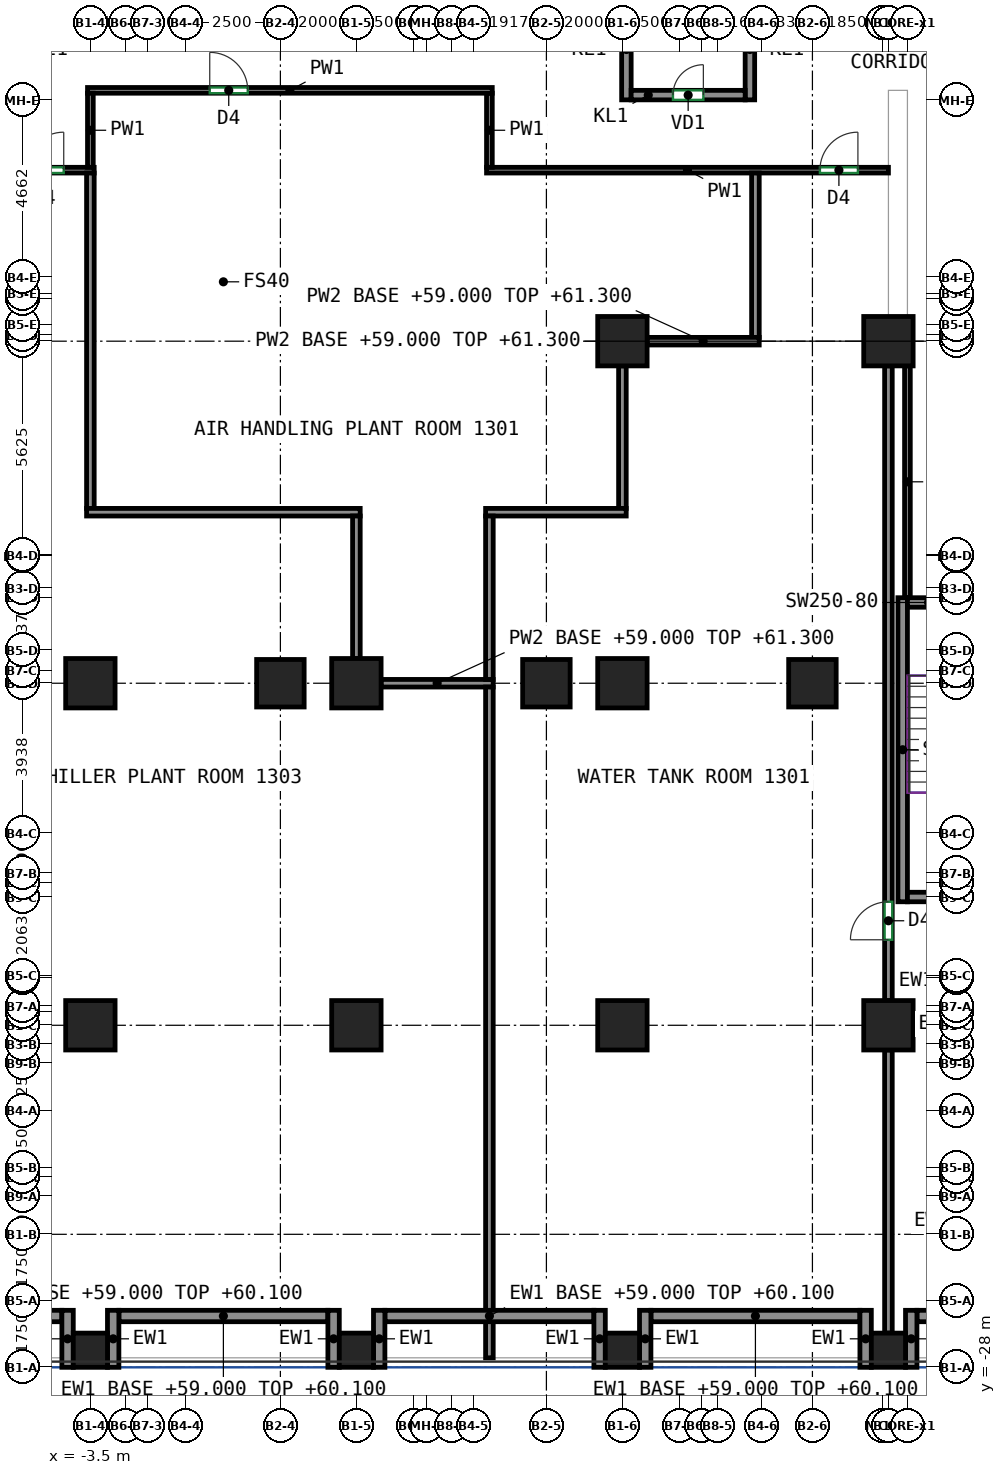
"""IFC4 building model, lengths in metres.
Left out: names, types, materials, properties, quantities, classifications, styles, units other than length and angle.
Written with IfcOpenShell. Run it as: python <this file> out.ifc"""

import sys

from ifc_helpers import new_model, si_unit, direction, frame, frame_2d, origin, origin_2d, place, context, subcontext, project, spatial, rectangle, extrude, source, transform, mapped, element, fill, save


model = new_model("IFC4")
c1 = context("Model", 3, precision=1e-05, world=origin(), true_north=direction((0.0, 1.0)))
c2 = subcontext(c1, "Body", "Model", "MODEL_VIEW")
j1 = project(units=[si_unit("LENGTHUNIT", "METRE"), si_unit("PLANEANGLEUNIT", "RADIAN")], contexts=[c1])
p1 = place(None, origin())
s1 = spatial("IfcSite", under=j1, at=p1, CompositionType="ELEMENT")
p2 = place(p1, origin())
s2 = spatial("IfcBuilding", under=s1, at=p2, CompositionType="ELEMENT")
p3 = place(p2, frame((0.0, 0.0, 59.0)))
s3 = spatial("IfcBuildingStorey", under=s2, at=p3, CompositionType="ELEMENT", Elevation=59.0)
m1 = source(origin(), c2, "Body", "SweptSolid", [
    extrude(rectangle(XDim=0.9, YDim=0.9, at=origin_2d()), origin(), (0.0, 0.0, 1.0), 2.3),
])
p4 = place(p3, frame((-3.5, -27.55, 0.0), z_axis=(0.0, 0.0, 1.0), x_axis=(1.0, 0.0, 0.0)))
e1 = element("IfcColumn", 1, at=p4, inside=s3, PredefinedType="COLUMN", context=c2, shape_type="MappedRepresentation", body=[
    mapped(m1, transform((0.0, 0.0, 0.0))),
])
m2 = source(origin(), c2, "Body", "SweptSolid", [
    extrude(rectangle(XDim=1.3, YDim=1.3, at=origin_2d()), origin(), (0.0, 0.0, 1.0), 2.3),
])
for number, where, z_axis, x_axis in (
    (2, (-3.5, -19.0, 0.0), (0.0, 0.0, 1.0), (1.0, 0.0, 0.0)),
    (3, (-3.5, -10.0, 0.0), (0.0, 0.0, 1.0), (1.0, 0.0, 0.0)),
):
    element("IfcColumn", number, at=place(p3, frame(where, z_axis=z_axis, x_axis=x_axis)), inside=s3, PredefinedType="COLUMN", context=c2, shape_type="MappedRepresentation", body=[
        mapped(m2, transform((0.0, 0.0, 0.0))),
    ])
p5 = place(p3, frame((3.5, -27.55, 0.0), z_axis=(0.0, 0.0, 1.0), x_axis=(1.0, 0.0, 0.0)))
e4 = element("IfcColumn", 4, at=p5, inside=s3, PredefinedType="COLUMN", context=c2, shape_type="MappedRepresentation", body=[
    mapped(m1, transform((0.0, 0.0, 0.0))),
])
for number, where, z_axis, x_axis in (
    (5, (3.5, -19.0, 0.0), (0.0, 0.0, 1.0), (1.0, 0.0, 0.0)),
    (6, (3.5, -10.0, 0.0), (0.0, 0.0, 1.0), (1.0, 0.0, 0.0)),
):
    element("IfcColumn", number, at=place(p3, frame(where, z_axis=z_axis, x_axis=x_axis)), inside=s3, PredefinedType="COLUMN", context=c2, shape_type="MappedRepresentation", body=[
        mapped(m2, transform((0.0, 0.0, 0.0))),
    ])
p6 = place(p3, frame((10.5, -27.55, 0.0), z_axis=(0.0, 0.0, 1.0), x_axis=(1.0, 0.0, 0.0)))
e7 = element("IfcColumn", 7, at=p6, inside=s3, PredefinedType="COLUMN", context=c2, shape_type="MappedRepresentation", body=[
    mapped(m1, transform((0.0, 0.0, 0.0))),
])
for number, where, z_axis, x_axis in (
    (8, (10.5, -19.0, 0.0), (0.0, 0.0, 1.0), (1.0, 0.0, 0.0)),
    (9, (10.5, -10.0, 0.0), (0.0, 0.0, 1.0), (1.0, 0.0, 0.0)),
    (10, (10.5, -1.0, 0.0), (0.0, 0.0, 1.0), (1.0, 0.0, 0.0)),
):
    element("IfcColumn", number, at=place(p3, frame(where, z_axis=z_axis, x_axis=x_axis)), inside=s3, PredefinedType="COLUMN", context=c2, shape_type="MappedRepresentation", body=[
        mapped(m2, transform((0.0, 0.0, 0.0))),
    ])
p7 = place(p3, frame((17.5, -27.55, 0.0), z_axis=(0.0, 0.0, 1.0), x_axis=(1.0, 0.0, 0.0)))
e11 = element("IfcColumn", 11, at=p7, inside=s3, PredefinedType="COLUMN", context=c2, shape_type="MappedRepresentation", body=[
    mapped(m1, transform((0.0, 0.0, 0.0))),
])
for number, where, z_axis, x_axis in (
    (12, (17.5, -19.0, 0.0), (0.0, 0.0, 1.0), (1.0, 0.0, 0.0)),
    (13, (17.5, -1.0, 0.0), (0.0, 0.0, 1.0), (1.0, 0.0, 0.0)),
):
    element("IfcColumn", number, at=place(p3, frame(where, z_axis=z_axis, x_axis=x_axis)), inside=s3, PredefinedType="COLUMN", context=c2, shape_type="MappedRepresentation", body=[
        mapped(m2, transform((0.0, 0.0, 0.0))),
    ])
m3 = source(origin(), c2, "Body", "SweptSolid", [
    extrude(rectangle(XDim=1.25, YDim=1.25, at=origin_2d()), origin(), (0.0, 0.0, 1.0), 3.8),
])
for number, where, z_axis, x_axis in (
    (14, (1.5, -10.0, 0.0), (0.0, 0.0, 1.0), (1.0, 0.0, 0.0)),
    (15, (8.5, -10.0, 0.0), (0.0, 0.0, 1.0), (1.0, 0.0, 0.0)),
    (16, (15.5, -10.0, 0.0), (0.0, 0.0, 1.0), (1.0, 0.0, 0.0)),
):
    element("IfcColumn", number, at=place(p3, frame(where, z_axis=z_axis, x_axis=x_axis)), inside=s3, PredefinedType="COLUMN", context=c2, shape_type="MappedRepresentation", body=[
        mapped(m3, transform((0.0, 0.0, 0.0))),
    ])
m4 = source(origin(), c2, "Body", "SweptSolid", [
    extrude(rectangle(XDim=8.0, YDim=0.25, at=frame_2d((4.0, 0.0))), origin(), (0.0, 0.0, 1.0), 3.8),
])
p8 = place(p3, frame((17.875, -15.75, 0.0), z_axis=(0.0, 0.0, 1.0), x_axis=(0.0, 1.0, 0.0)))
e17 = element("IfcWall", 17, at=p8, inside=s3, PredefinedType="SHEAR", context=c2, shape_type="MappedRepresentation", body=[
    mapped(m4, transform((0.0, 0.0, 0.0))),
])
m5 = source(origin(), c2, "Body", "SweptSolid", [
    extrude(rectangle(XDim=3.7, YDim=0.25, at=frame_2d((1.85, 0.0))), origin(), (0.0, 0.0, 1.0), 3.8),
])
p9 = place(p3, frame((18.0, -15.625, 0.0), z_axis=(0.0, 0.0, 1.0), x_axis=(1.0, 0.0, 0.0)))
e18 = element("IfcWall", 18, at=p9, inside=s3, PredefinedType="SHEAR", context=c2, shape_type="MappedRepresentation", body=[
    mapped(m5, transform((0.0, 0.0, 0.0))),
])
p10 = place(p3, frame((18.0, -7.875, 0.0), z_axis=(0.0, 0.0, 1.0), x_axis=(1.0, 0.0, 0.0)))
e19 = element("IfcWall", 19, at=p10, inside=s3, PredefinedType="SHEAR", context=c2, shape_type="MappedRepresentation", body=[
    mapped(m5, transform((0.0, 0.0, 0.0))),
])
p11 = place(p10, frame((1.25, 0.0, 0.0)))
e20 = element("IfcOpeningElement", 20, at=p11, cuts=e19, PredefinedType="OPENING", context=c2, shape_type="SweptSolid", body=[
    extrude(rectangle(XDim=1.2, YDim=2.1, at=frame_2d((0.6, 1.05))), frame((0.0, 0.135, 0.0), z_axis=(0.0, -1.0, 0.0), x_axis=(1.0, 0.0, 0.0)), (0.0, 0.0, 1.0), 0.27),
])
m6 = source(origin(), c2, "Body", "SweptSolid", [
    extrude(rectangle(XDim=5.5, YDim=0.3, at=frame_2d((2.75, 0.0))), origin(), (0.0, 0.0, 1.0), 1.1),
])
p12 = place(p3, frame((-9.75, -26.65, 0.0), z_axis=(0.0, 0.0, 1.0), x_axis=(1.0, 0.0, 0.0)))
e21 = element("IfcWall", 21, at=p12, inside=s3, PredefinedType="SOLIDWALL", context=c2, shape_type="MappedRepresentation", body=[
    mapped(m6, transform((0.0, 0.0, 0.0))),
])
m7 = source(origin(), c2, "Body", "SweptSolid", [
    extrude(rectangle(XDim=1.5, YDim=0.3, at=frame_2d((0.75, 0.0))), origin(), (0.0, 0.0, 1.0), 2.3),
])
p13 = place(p3, frame((-4.1, -28.0, 0.0), z_axis=(0.0, 0.0, 1.0), x_axis=(0.0, 1.0, 0.0)))
e22 = element("IfcWall", 22, at=p13, inside=s3, PredefinedType="SOLIDWALL", context=c2, shape_type="MappedRepresentation", body=[
    mapped(m7, transform((0.0, 0.0, 0.0))),
])
p14 = place(p3, frame((-2.75, -26.65, 0.0), z_axis=(0.0, 0.0, 1.0), x_axis=(1.0, 0.0, 0.0)))
e23 = element("IfcWall", 23, at=p14, inside=s3, PredefinedType="SOLIDWALL", context=c2, shape_type="MappedRepresentation", body=[
    mapped(m6, transform((0.0, 0.0, 0.0))),
])
for number, where, z_axis, x_axis in (
    (24, (-2.9, -28.0, 0.0), (0.0, 0.0, 1.0), (0.0, 1.0, 0.0)),
    (25, (2.9, -28.0, 0.0), (0.0, 0.0, 1.0), (0.0, 1.0, 0.0)),
):
    element("IfcWall", number, at=place(p3, frame(where, z_axis=z_axis, x_axis=x_axis)), inside=s3, PredefinedType="SOLIDWALL", context=c2, shape_type="MappedRepresentation", body=[
        mapped(m7, transform((0.0, 0.0, 0.0))),
    ])
p15 = place(p3, frame((4.25, -26.65, 0.0), z_axis=(0.0, 0.0, 1.0), x_axis=(1.0, 0.0, 0.0)))
e26 = element("IfcWall", 26, at=p15, inside=s3, PredefinedType="SOLIDWALL", context=c2, shape_type="MappedRepresentation", body=[
    mapped(m6, transform((0.0, 0.0, 0.0))),
])
for number, where, z_axis, x_axis in (
    (27, (4.1, -28.0, 0.0), (0.0, 0.0, 1.0), (0.0, 1.0, 0.0)),
    (28, (9.9, -28.0, 0.0), (0.0, 0.0, 1.0), (0.0, 1.0, 0.0)),
):
    element("IfcWall", number, at=place(p3, frame(where, z_axis=z_axis, x_axis=x_axis)), inside=s3, PredefinedType="SOLIDWALL", context=c2, shape_type="MappedRepresentation", body=[
        mapped(m7, transform((0.0, 0.0, 0.0))),
    ])
p16 = place(p3, frame((11.25, -26.65, 0.0), z_axis=(0.0, 0.0, 1.0), x_axis=(1.0, 0.0, 0.0)))
e29 = element("IfcWall", 29, at=p16, inside=s3, PredefinedType="SOLIDWALL", context=c2, shape_type="MappedRepresentation", body=[
    mapped(m6, transform((0.0, 0.0, 0.0))),
])
for number, where, z_axis, x_axis in (
    (30, (11.1, -28.0, 0.0), (0.0, 0.0, 1.0), (0.0, 1.0, 0.0)),
    (31, (16.9, -28.0, 0.0), (0.0, 0.0, 1.0), (0.0, 1.0, 0.0)),
):
    element("IfcWall", number, at=place(p3, frame(where, z_axis=z_axis, x_axis=x_axis)), inside=s3, PredefinedType="SOLIDWALL", context=c2, shape_type="MappedRepresentation", body=[
        mapped(m7, transform((0.0, 0.0, 0.0))),
    ])
p17 = place(p3, frame((18.25, -26.65, 0.0), z_axis=(0.0, 0.0, 1.0), x_axis=(1.0, 0.0, 0.0)))
e32 = element("IfcWall", 32, at=p17, inside=s3, PredefinedType="SOLIDWALL", context=c2, shape_type="MappedRepresentation", body=[
    mapped(m6, transform((0.0, 0.0, 0.0))),
])
p18 = place(p3, frame((18.1, -28.0, 0.0), z_axis=(0.0, 0.0, 1.0), x_axis=(0.0, 1.0, 0.0)))
e33 = element("IfcWall", 33, at=p18, inside=s3, PredefinedType="SOLIDWALL", context=c2, shape_type="MappedRepresentation", body=[
    mapped(m7, transform((0.0, 0.0, 0.0))),
])
m8 = source(origin(), c2, "Body", "SweptSolid", [
    extrude(rectangle(XDim=2.65, YDim=0.25, at=frame_2d((1.325, 0.0))), origin(), (0.0, 0.0, 1.0), 3.8),
])
for number, where, z_axis, x_axis in (
    (34, (10.605, 5.35, 0.0), (0.0, 0.0, 1.0), (0.0, 1.0, 0.0)),
    (35, (13.855, 5.35, 0.0), (0.0, 0.0, 1.0), (0.0, 1.0, 0.0)),
):
    element("IfcWall", number, at=place(p3, frame(where, z_axis=z_axis, x_axis=x_axis)), inside=s3, PredefinedType="PARTITIONING", context=c2, shape_type="MappedRepresentation", body=[
        mapped(m8, transform((0.0, 0.0, 0.0))),
    ])
m9 = source(origin(), c2, "Body", "SweptSolid", [
    extrude(rectangle(XDim=3.0, YDim=0.25, at=frame_2d((1.5, 0.0))), origin(), (0.0, 0.0, 1.0), 3.8),
])
p19 = place(p3, frame((10.73, 5.475, 0.0), z_axis=(0.0, 0.0, 1.0), x_axis=(1.0, 0.0, 0.0)))
e36 = element("IfcWall", 36, at=p19, inside=s3, PredefinedType="PARTITIONING", context=c2, shape_type="MappedRepresentation", body=[
    mapped(m9, transform((0.0, 0.0, 0.0))),
])
p20 = place(p19, frame((1.1, 0.0, 0.0)))
e37 = element("IfcOpeningElement", 37, at=p20, cuts=e36, PredefinedType="OPENING", context=c2, shape_type="SweptSolid", body=[
    extrude(rectangle(XDim=0.8, YDim=2.0, at=frame_2d((0.4, 1.0))), frame((0.0, 0.135, 0.0), z_axis=(0.0, -1.0, 0.0), x_axis=(1.0, 0.0, 0.0)), (0.0, 0.0, 1.0), 0.27),
])
p21 = place(p3, frame((-14.075, 3.5, 0.0), z_axis=(0.0, 0.0, 1.0), x_axis=(1.0, 0.0, 0.0)))
e38 = element("IfcWall", 38, at=p21, inside=s3, PredefinedType="PARTITIONING", context=c2, shape_type="SweptSolid", body=[
    extrude(rectangle(XDim=10.675, YDim=0.15, at=frame_2d((5.337, 0.0))), origin(), (0.0, 0.0, 1.0), 3.8),
])
p22 = place(p21, frame((8.874, 0.0, 0.0)))
e39 = element("IfcOpeningElement", 39, at=p22, cuts=e38, PredefinedType="OPENING", context=c2, shape_type="SweptSolid", body=[
    extrude(rectangle(XDim=1.0, YDim=2.1, at=frame_2d((0.5, 1.05))), frame((0.0, 0.085, 0.0), z_axis=(0.0, -1.0, 0.0), x_axis=(1.0, 0.0, 0.0)), (0.0, 0.0, 1.0), 0.17),
])
p23 = place(p3, frame((6.925, 3.5, 0.0), z_axis=(0.0, 0.0, 1.0), x_axis=(1.0, 0.0, 0.0)))
e40 = element("IfcWall", 40, at=p23, inside=s3, PredefinedType="PARTITIONING", context=c2, shape_type="SweptSolid", body=[
    extrude(rectangle(XDim=10.575, YDim=0.15, at=frame_2d((5.288, 0.0))), origin(), (0.0, 0.0, 1.0), 3.8),
])
p24 = place(p23, frame((8.772, 0.0, 0.0)))
e41 = element("IfcOpeningElement", 41, at=p24, cuts=e40, PredefinedType="OPENING", context=c2, shape_type="SweptSolid", body=[
    extrude(rectangle(XDim=1.0, YDim=2.1, at=frame_2d((0.5, 1.05))), frame((0.0, 0.085, 0.0), z_axis=(0.0, -1.0, 0.0), x_axis=(1.0, 0.0, 0.0)), (0.0, 0.0, 1.0), 0.17),
])
p25 = place(p3, frame((7.0, 5.525, 0.0), z_axis=(0.0, 0.0, 1.0), x_axis=(0.0, -1.0, 0.0)))
e42 = element("IfcWall", 42, at=p25, inside=s3, PredefinedType="PARTITIONING", context=c2, shape_type="SweptSolid", body=[
    extrude(rectangle(XDim=1.95, YDim=0.15, at=frame_2d((0.975, 0.0))), origin(), (0.0, 0.0, 1.0), 3.8),
])
p26 = place(p3, frame((-3.575, 5.6, 0.0), z_axis=(0.0, 0.0, 1.0), x_axis=(1.0, 0.0, 0.0)))
e43 = element("IfcWall", 43, at=p26, inside=s3, PredefinedType="PARTITIONING", context=c2, shape_type="SweptSolid", body=[
    extrude(rectangle(XDim=10.65, YDim=0.15, at=frame_2d((5.325, 0.0))), origin(), (0.0, 0.0, 1.0), 3.8),
])
p27 = place(p26, frame((3.216, 0.0, 0.0)))
e44 = element("IfcOpeningElement", 44, at=p27, cuts=e43, PredefinedType="OPENING", context=c2, shape_type="SweptSolid", body=[
    extrude(rectangle(XDim=1.0, YDim=2.1, at=frame_2d((0.5, 1.05))), frame((0.0, 0.085, 0.0), z_axis=(0.0, -1.0, 0.0), x_axis=(1.0, 0.0, 0.0)), (0.0, 0.0, 1.0), 0.17),
])
p28 = place(p3, frame((-3.5, 3.575, 0.0), z_axis=(0.0, 0.0, 1.0), x_axis=(0.0, 1.0, 0.0)))
e45 = element("IfcWall", 45, at=p28, inside=s3, PredefinedType="PARTITIONING", context=c2, shape_type="SweptSolid", body=[
    extrude(rectangle(XDim=1.95, YDim=0.15, at=frame_2d((0.975, 0.0))), origin(), (0.0, 0.0, 1.0), 3.8),
])
p29 = place(p3, frame((18.0, -1.65, 0.0), z_axis=(0.0, 0.0, 1.0), x_axis=(0.0, -1.0, 0.0)))
e46 = element("IfcWall", 46, at=p29, inside=s3, PredefinedType="PARTITIONING", context=c2, shape_type="SweptSolid", body=[
    extrude(rectangle(XDim=6.1, YDim=0.15, at=frame_2d((3.05, 0.0))), origin(), (0.0, 0.0, 1.0), 3.8),
])
p30 = place(p3, frame((4.15, -10.0, 0.0), z_axis=(0.0, 0.0, 1.0), x_axis=(1.0, 0.0, 0.0)))
e47 = element("IfcWall", 47, at=p30, inside=s3, PredefinedType="PARTITIONING", context=c2, shape_type="SweptSolid", body=[
    extrude(rectangle(XDim=2.95, YDim=0.2, at=frame_2d((1.475, 0.0))), origin(), (0.0, 0.0, 1.0), 2.3),
])
p31 = place(p3, frame((-3.5, -5.4, 0.0), z_axis=(0.0, 0.0, 1.0), x_axis=(0.0, 1.0, 0.0)))
e48 = element("IfcWall", 48, at=p31, inside=s3, PredefinedType="PARTITIONING", context=c2, shape_type="SweptSolid", body=[
    extrude(rectangle(XDim=8.824, YDim=0.2, at=frame_2d((4.412, 0.0))), origin(), (0.0, 0.0, 1.0), 3.8),
])
p32 = place(p3, frame((-3.6, -5.5, 0.0), z_axis=(0.0, 0.0, 1.0), x_axis=(1.0, 0.0, 0.0)))
e49 = element("IfcWall", 49, at=p32, inside=s3, PredefinedType="PARTITIONING", context=c2, shape_type="SweptSolid", body=[
    extrude(rectangle(XDim=7.2, YDim=0.2, at=frame_2d((3.6, 0.0))), origin(), (0.0, 0.0, 1.0), 3.8),
])
p33 = place(p3, frame((3.5, -9.35, 0.0), z_axis=(0.0, 0.0, 1.0), x_axis=(0.0, 1.0, 0.0)))
e50 = element("IfcWall", 50, at=p33, inside=s3, PredefinedType="PARTITIONING", context=c2, shape_type="SweptSolid", body=[
    extrude(rectangle(XDim=3.75, YDim=0.2, at=frame_2d((1.875, 0.0))), origin(), (0.0, 0.0, 1.0), 3.8),
])
p34 = place(p3, frame((7.0, -27.75, 0.0), z_axis=(0.0, 0.0, 1.0), x_axis=(0.0, 1.0, 0.0)))
e51 = element("IfcWall", 51, at=p34, inside=s3, PredefinedType="PARTITIONING", context=c2, shape_type="SweptSolid", body=[
    extrude(rectangle(XDim=0.98, YDim=0.2, at=frame_2d((0.49, 0.0))), origin(), (0.0, 0.0, 1.0), 3.8),
])
p35 = place(p3, frame((7.0, -26.53, 0.0), z_axis=(0.0, 0.0, 1.0), x_axis=(0.0, 1.0, 0.0)))
e52 = element("IfcWall", 52, at=p35, inside=s3, PredefinedType="PARTITIONING", context=c2, shape_type="SweptSolid", body=[
    extrude(rectangle(XDim=16.43, YDim=0.2, at=frame_2d((8.215, 0.0))), origin(), (0.0, 0.0, 1.0), 3.8),
])
p36 = place(p3, frame((14.0, -0.9, 0.0), z_axis=(0.0, 0.0, 1.0), x_axis=(0.0, 1.0, 0.0)))
e53 = element("IfcWall", 53, at=p36, inside=s3, PredefinedType="PARTITIONING", context=c2, shape_type="SweptSolid", body=[
    extrude(rectangle(XDim=4.324, YDim=0.2, at=frame_2d((2.162, 0.0))), origin(), (0.0, 0.0, 1.0), 3.8),
])
p37 = place(p3, frame((11.15, -1.0, 0.0), z_axis=(0.0, 0.0, 1.0), x_axis=(1.0, 0.0, 0.0)))
e54 = element("IfcWall", 54, at=p37, inside=s3, PredefinedType="PARTITIONING", context=c2, shape_type="SweptSolid", body=[
    extrude(rectangle(XDim=2.95, YDim=0.2, at=frame_2d((1.475, 0.0))), origin(), (0.0, 0.0, 1.0), 2.3),
])
p38 = place(p3, frame((10.5, -5.4, 0.0), z_axis=(0.0, 0.0, 1.0), x_axis=(0.0, 1.0, 0.0)))
e55 = element("IfcWall", 55, at=p38, inside=s3, PredefinedType="PARTITIONING", context=c2, shape_type="SweptSolid", body=[
    extrude(rectangle(XDim=3.75, YDim=0.2, at=frame_2d((1.875, 0.0))), origin(), (0.0, 0.0, 1.0), 3.8),
])
p39 = place(p3, frame((6.9, -5.5, 0.0), z_axis=(0.0, 0.0, 1.0), x_axis=(1.0, 0.0, 0.0)))
e56 = element("IfcWall", 56, at=p39, inside=s3, PredefinedType="PARTITIONING", context=c2, shape_type="SweptSolid", body=[
    extrude(rectangle(XDim=3.7, YDim=0.2, at=frame_2d((1.85, 0.0))), origin(), (0.0, 0.0, 1.0), 3.8),
])
p40 = place(p3, frame((7.0, -9.9, 0.0), z_axis=(0.0, 0.0, 1.0), x_axis=(0.0, 1.0, 0.0)))
e57 = element("IfcWall", 57, at=p40, inside=s3, PredefinedType="PARTITIONING", context=c2, shape_type="SweptSolid", body=[
    extrude(rectangle(XDim=4.3, YDim=0.2, at=frame_2d((2.15, 0.0))), origin(), (0.0, 0.0, 1.0), 3.8),
])
p41 = place(p3, frame((17.5, -18.35, 0.0), z_axis=(0.0, 0.0, 1.0), x_axis=(0.0, 1.0, 0.0)))
e58 = element("IfcWall", 58, at=p41, inside=s3, PredefinedType="PARTITIONING", context=c2, shape_type="SweptSolid", body=[
    extrude(rectangle(XDim=16.7, YDim=0.2, at=frame_2d((8.35, 0.0))), origin(), (0.0, 0.0, 1.0), 3.8),
])
p42 = place(p41, frame((1.6, 0.0, 0.0)))
e59 = element("IfcOpeningElement", 59, at=p42, cuts=e58, PredefinedType="OPENING", context=c2, shape_type="SweptSolid", body=[
    extrude(rectangle(XDim=1.0, YDim=2.1, at=frame_2d((0.5, 1.05))), frame((0.0, 0.11, 0.0), z_axis=(0.0, -1.0, 0.0), x_axis=(1.0, 0.0, 0.0)), (0.0, 0.0, 1.0), 0.22),
])
p43 = place(p3, frame((17.5, -27.1, 0.0), z_axis=(0.0, 0.0, 1.0), x_axis=(0.0, 1.0, 0.0)))
e60 = element("IfcWall", 60, at=p43, inside=s3, PredefinedType="PARTITIONING", context=c2, shape_type="SweptSolid", body=[
    extrude(rectangle(XDim=7.45, YDim=0.2, at=frame_2d((3.725, 0.0))), origin(), (0.0, 0.0, 1.0), 3.8),
])
p44 = place(p20, origin())
e61 = element("IfcDoor", 61, at=p44, inside=s3, OperationType="SINGLE_SWING_RIGHT", PredefinedType="DOOR", context=c2, shape_type="SweptSolid", body=[
    extrude(rectangle(XDim=0.8, YDim=2.0, at=frame_2d((0.4, 1.0))), frame((0.0, 0.025, 0.0), z_axis=(0.0, -1.0, 0.0), x_axis=(1.0, 0.0, 0.0)), (0.0, 0.0, 1.0), 0.05),
])
fill(e37, e61)
p45 = place(p42, origin())
e62 = element("IfcDoor", 62, at=p45, inside=s3, OperationType="SINGLE_SWING_LEFT", PredefinedType="DOOR", context=c2, shape_type="SweptSolid", body=[
    extrude(rectangle(XDim=1.0, YDim=2.1, at=frame_2d((0.5, 1.05))), frame((0.0, 0.025, 0.0), z_axis=(0.0, -1.0, 0.0), x_axis=(1.0, 0.0, 0.0)), (0.0, 0.0, 1.0), 0.05),
])
fill(e59, e62)
p46 = place(p22, origin())
e63 = element("IfcDoor", 63, at=p46, inside=s3, OperationType="SINGLE_SWING_RIGHT", PredefinedType="DOOR", context=c2, shape_type="SweptSolid", body=[
    extrude(rectangle(XDim=1.0, YDim=2.1, at=frame_2d((0.5, 1.05))), frame((0.0, 0.025, 0.0), z_axis=(0.0, -1.0, 0.0), x_axis=(1.0, 0.0, 0.0)), (0.0, 0.0, 1.0), 0.05),
])
fill(e39, e63)
p47 = place(p24, origin())
e64 = element("IfcDoor", 64, at=p47, inside=s3, OperationType="SINGLE_SWING_RIGHT", PredefinedType="DOOR", context=c2, shape_type="SweptSolid", body=[
    extrude(rectangle(XDim=1.0, YDim=2.1, at=frame_2d((0.5, 1.05))), frame((0.0, 0.025, 0.0), z_axis=(0.0, -1.0, 0.0), x_axis=(1.0, 0.0, 0.0)), (0.0, 0.0, 1.0), 0.05),
])
fill(e41, e64)
p48 = place(p27, origin())
e65 = element("IfcDoor", 65, at=p48, inside=s3, OperationType="SINGLE_SWING_LEFT", PredefinedType="DOOR", context=c2, shape_type="SweptSolid", body=[
    extrude(rectangle(XDim=1.0, YDim=2.1, at=frame_2d((0.5, 1.05))), frame((0.0, 0.025, 0.0), z_axis=(0.0, -1.0, 0.0), x_axis=(1.0, 0.0, 0.0)), (0.0, 0.0, 1.0), 0.05),
])
fill(e44, e65)
save(model, sys.argv[1])
